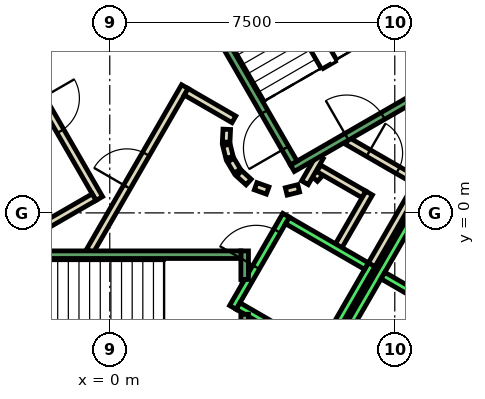
"""IFC4 building model, lengths in metres.
Left out: names, types, materials, properties, quantities, classifications, styles, units other than length and angle.
Written with IfcOpenShell. Run it as: python <this file> out.ifc"""

import sys

from ifc_helpers import new_model, si_unit, direction, frame, frame_2d, origin, place, context, subcontext, project, spatial, rectangle, extrude, element, fill, save


model = new_model("IFC4")
c1 = context("Model", 3, precision=1e-05, world=origin(), true_north=direction((0.0, 1.0)))
c2 = subcontext(c1, "Body", "Model", "MODEL_VIEW")
j1 = project(units=[si_unit("LENGTHUNIT", "METRE"), si_unit("PLANEANGLEUNIT", "RADIAN")], contexts=[c1])
p1 = place(None, origin())
s1 = spatial("IfcSite", under=j1, at=p1, CompositionType="ELEMENT")
p2 = place(p1, origin())
s2 = spatial("IfcBuilding", under=s1, at=p2, CompositionType="ELEMENT")
p3 = place(p2, frame((0.0, 0.0, 167.6)))
s3 = spatial("IfcBuildingStorey", under=s2, at=p3, CompositionType="ELEMENT", Elevation=167.6)
p4 = place(p3, frame((5.39, 0.898, 0.0), z_axis=(0.0, 0.0, 1.0), x_axis=(0.673828488714, 0.738887791073, 0.0)))
e1 = element("IfcWall", 1, at=p4, inside=s3, PredefinedType="PARTITIONING", context=c2, shape_type="SweptSolid", body=[
    extrude(rectangle(XDim=0.263, YDim=0.2, at=frame_2d((0.131, 0.0))), origin(), (0.0, 0.0, 1.0), 3.8),
])
p5 = place(p3, frame((5.499, 1.172, 0.0), z_axis=(0.0, 0.0, 1.0), x_axis=(0.866333505267, -0.499465972466, 0.0)))
e2 = element("IfcWall", 2, at=p5, inside=s3, PredefinedType="PARTITIONING", context=c2, shape_type="SweptSolid", body=[
    extrude(rectangle(XDim=1.374, YDim=0.2, at=frame_2d((0.687, 0.0))), origin(), (0.0, 0.0, 1.0), 3.8),
])
p6 = place(p3, frame((6.826, 0.522, 0.0), z_axis=(0.0, 0.0, 1.0), x_axis=(-0.500016722714, -0.866015748706, 0.0)))
e3 = element("IfcWall", 3, at=p6, inside=s3, PredefinedType="PARTITIONING", context=c2, shape_type="SweptSolid", body=[
    extrude(rectangle(XDim=1.7, YDim=0.2, at=frame_2d((0.85, 0.0))), origin(), (0.0, 0.0, 1.0), 3.8),
])
p7 = place(p3, frame((6.25, 1.894, 0.0), z_axis=(0.0, 0.0, 1.0), x_axis=(0.866043184279, -0.499969202016, 0.0)))
e4 = element("IfcWall", 4, at=p7, inside=s3, PredefinedType="PARTITIONING", context=c2, shape_type="SweptSolid", body=[
    extrude(rectangle(XDim=2.084, YDim=0.2, at=frame_2d((1.042, 0.0))), origin(), (0.0, 0.0, 1.0), 3.8),
])
p8 = place(p7, frame((0.642, 0.0, 0.0)))
e5 = element("IfcOpeningElement", 5, at=p8, cuts=e4, PredefinedType="OPENING", context=c2, shape_type="SweptSolid", body=[
    extrude(rectangle(XDim=0.9, YDim=2.1, at=frame_2d((0.45, 1.05))), frame((0.0, 0.11, 0.0), z_axis=(0.0, -1.0, 0.0), x_axis=(1.0, 0.0, 0.0)), (0.0, 0.0, 1.0), 0.22),
])
p9 = place(p3, frame((8.192, 0.888, 0.0), z_axis=(0.0, 0.0, 1.0), x_axis=(-0.499940625693, -0.866059680843, 0.0)))
e6 = element("IfcWall", 6, at=p9, inside=s3, PredefinedType="PARTITIONING", context=c2, shape_type="SweptSolid", body=[
    extrude(rectangle(XDim=2.68, YDim=0.2, at=frame_2d((1.34, 0.0))), origin(), (0.0, 0.0, 1.0), 3.8),
])
p10 = place(p3, frame((5.135, 0.793, 0.0), z_axis=(0.0, 0.0, 1.0), x_axis=(0.499526442893, 0.866298639529, 0.0)))
e7 = element("IfcWall", 7, at=p10, inside=s3, PredefinedType="PARTITIONING", context=c2, shape_type="SweptSolid", body=[
    extrude(rectangle(XDim=0.791, YDim=0.2, at=frame_2d((0.396, 0.0))), origin(), (0.0, 0.0, 1.0), 3.8),
])
p11 = place(p3, frame((-0.52, -1.0, 0.0), z_axis=(0.0, 0.0, 1.0), x_axis=(0.50011622646, 0.865958290007, 0.0)))
e8 = element("IfcWall", 8, at=p11, inside=s3, PredefinedType="PARTITIONING", context=c2, shape_type="SweptSolid", body=[
    extrude(rectangle(XDim=4.991, YDim=0.2, at=frame_2d((2.496, 0.0))), origin(), (0.0, 0.0, 1.0), 3.8),
])
p12 = place(p11, frame((1.945, 0.0, 0.0)))
e9 = element("IfcOpeningElement", 9, at=p12, cuts=e8, PredefinedType="OPENING", context=c2, shape_type="SweptSolid", body=[
    extrude(rectangle(XDim=1.0, YDim=2.1, at=frame_2d((0.5, 1.05))), frame((0.0, 0.11, 0.0), z_axis=(0.0, -1.0, 0.0), x_axis=(1.0, 0.0, 0.0)), (0.0, 0.0, 1.0), 0.22),
])
p13 = place(p3, frame((2.012, 3.186, 0.0), z_axis=(0.0, 0.0, 1.0), x_axis=(0.865891012941, -0.500232699559, 0.0)))
e10 = element("IfcWall", 10, at=p13, inside=s3, PredefinedType="PARTITIONING", context=c2, shape_type="SweptSolid", body=[
    extrude(rectangle(XDim=1.449, YDim=0.2, at=frame_2d((0.725, 0.0))), origin(), (0.0, 0.0, 1.0), 3.8),
])
p14 = place(p3, frame((3.079, 2.199, 0.0), z_axis=(0.0, 0.0, 1.0), x_axis=(-0.047771483479, -0.998858290933, 0.0)))
e11 = element("IfcWall", 11, at=p14, inside=s3, PredefinedType="PARTITIONING", context=c2, shape_type="SweptSolid", body=[
    extrude(rectangle(XDim=0.337, YDim=0.2, at=frame_2d((0.169, 0.0))), origin(), (0.0, 0.0, 1.0), 3.8),
])
p15 = place(p3, frame((3.07, 1.786, 0.0), z_axis=(0.0, 0.0, 1.0), x_axis=(0.242705583207, -0.970099994784, 0.0)))
e12 = element("IfcWall", 12, at=p15, inside=s3, PredefinedType="PARTITIONING", context=c2, shape_type="SweptSolid", body=[
    extrude(rectangle(XDim=0.338, YDim=0.2, at=frame_2d((0.169, 0.0))), origin(), (0.0, 0.0, 1.0), 3.8),
])
for number, where, z_axis, x_axis in (
    (13, (3.182, 1.388, 0.0), (0.0, 0.0, 1.0), (0.512, -0.859, 0.0)),
    (14, (3.404, 1.039, 0.0), (0.0, 0.0, 1.0), (0.74, -0.672, 0.0)),
):
    element("IfcWall", number, at=place(p3, frame(where, z_axis=z_axis, x_axis=x_axis)), inside=s3, PredefinedType="PARTITIONING", context=c2, shape_type="SweptSolid", body=[
        extrude(rectangle(XDim=0.338, YDim=0.2, at=frame_2d((0.169, 0.0))), origin(), (0.0, 0.0, 1.0), 3.8),
    ])
p16 = place(p3, frame((3.838, 0.702, 0.0), z_axis=(0.0, 0.0, 1.0), x_axis=(0.941035081519, -0.338308993895, 0.0)))
e15 = element("IfcWall", 15, at=p16, inside=s3, PredefinedType="PARTITIONING", context=c2, shape_type="SweptSolid", body=[
    extrude(rectangle(XDim=0.337, YDim=0.2, at=frame_2d((0.168, 0.0))), origin(), (0.0, 0.0, 1.0), 3.8),
])
p17 = place(p3, frame((4.644, 0.564, 0.0), z_axis=(0.0, 0.0, 1.0), x_axis=(0.969929076366, 0.243387729394, 0.0)))
e16 = element("IfcWall", 16, at=p17, inside=s3, PredefinedType="PARTITIONING", context=c2, shape_type="SweptSolid", body=[
    extrude(rectangle(XDim=0.337, YDim=0.2, at=frame_2d((0.168, 0.0))), origin(), (0.0, 0.0, 1.0), 3.8),
])
p18 = place(p3, frame((-2.771, 4.7, 0.0), z_axis=(0.0, 0.0, 1.0), x_axis=(0.499969479948, -0.866043023828, 0.0)))
e17 = element("IfcWall", 17, at=p18, inside=s3, PredefinedType="PARTITIONING", context=c2, shape_type="SweptSolid", body=[
    extrude(rectangle(XDim=4.99, YDim=0.2, at=frame_2d((2.495, 0.0))), origin(), (0.0, 0.0, 1.0), 3.8),
])
p19 = place(p18, frame((1.945, 0.0, 0.0)))
e18 = element("IfcOpeningElement", 18, at=p19, cuts=e17, PredefinedType="OPENING", context=c2, shape_type="SweptSolid", body=[
    extrude(rectangle(XDim=1.0, YDim=2.1, at=frame_2d((0.5, 1.05))), frame((0.0, 0.11, 0.0), z_axis=(0.0, -1.0, 0.0), x_axis=(1.0, 0.0, 0.0)), (0.0, 0.0, 1.0), 0.22),
])
p20 = place(p3, frame((-0.412, 0.414, 0.0), z_axis=(0.0, 0.0, 1.0), x_axis=(-0.866017369001, -0.500013916395, 0.0)))
e19 = element("IfcWall", 19, at=p20, inside=s3, PredefinedType="PARTITIONING", context=c2, shape_type="SweptSolid", body=[
    extrude(rectangle(XDim=1.45, YDim=0.2, at=frame_2d((0.725, 0.0))), origin(), (0.0, 0.0, 1.0), 3.8),
])
p21 = place(p3, frame((3.24, -2.488, 0.0), z_axis=(0.0, 0.0, 1.0), x_axis=(0.49994636267, 0.866056369097, 0.0)))
e20 = element("IfcWall", 20, at=p21, inside=s3, PredefinedType="STANDARD", context=c2, shape_type="SweptSolid", body=[
    extrude(rectangle(XDim=2.8, YDim=0.2, at=frame_2d((1.4, 0.0))), origin(), (0.0, 0.0, 1.0), 3.8),
])
p22 = place(p21, frame((1.225, 0.0, 0.0)))
e21 = element("IfcOpeningElement", 21, at=p22, cuts=e20, PredefinedType="OPENING", context=c2, shape_type="SweptSolid", body=[
    extrude(rectangle(XDim=1.1, YDim=2.1, at=frame_2d((0.55, 1.05))), frame((0.0, 0.11, 0.0), z_axis=(0.0, -1.0, 0.0), x_axis=(1.0, 0.0, 0.0)), (0.0, 0.0, 1.0), 0.22),
])
p23 = place(p3, frame((5.492, -3.788, 0.0), z_axis=(0.0, 0.0, 1.0), x_axis=(0.500011755427, 0.866018616679, 0.0)))
e22 = element("IfcWall", 22, at=p23, inside=s3, PredefinedType="STANDARD", context=c2, shape_type="SweptSolid", body=[
    extrude(rectangle(XDim=2.8, YDim=0.2, at=frame_2d((1.4, 0.0))), origin(), (0.0, 0.0, 1.0), 3.8),
])
p24 = place(p3, frame((3.377, -2.452, 0.0), z_axis=(0.0, 0.0, 1.0), x_axis=(0.865955154139, -0.50012165622, 0.0)))
e23 = element("IfcWall", 23, at=p24, inside=s3, PredefinedType="STANDARD", context=c2, shape_type="SweptSolid", body=[
    extrude(rectangle(XDim=2.4, YDim=0.2, at=frame_2d((1.2, 0.0))), origin(), (0.0, 0.0, 1.0), 3.8),
])
p25 = place(p3, frame((4.677, -0.2, 0.0), z_axis=(0.0, 0.0, 1.0), x_axis=(0.865973769406, -0.500089422704, 0.0)))
e24 = element("IfcWall", 24, at=p25, inside=s3, PredefinedType="STANDARD", context=c2, shape_type="SweptSolid", body=[
    extrude(rectangle(XDim=2.399, YDim=0.2, at=frame_2d((1.2, 0.0))), origin(), (0.0, 0.0, 1.0), 3.8),
])
p26 = place(p3, frame((4.451, -6.19, 0.0), z_axis=(0.0, 0.0, 1.0), x_axis=(0.50000090737, 0.866024879913, 0.0)))
e25 = element("IfcWall", 25, at=p26, inside=s3, PredefinedType="STANDARD", context=c2, shape_type="SweptSolid", body=[
    extrude(rectangle(XDim=10.6, YDim=0.2, at=frame_2d((5.3, 0.0))), origin(), (0.0, 0.0, 1.0), 3.8),
])
p27 = place(p3, frame((7.188, -1.65, 0.0), z_axis=(0.0, 0.0, 1.0), x_axis=(0.866022959057, -0.500004234368, 0.0)))
e26 = element("IfcWall", 26, at=p27, inside=s3, PredefinedType="STANDARD", context=c2, shape_type="SweptSolid", body=[
    extrude(rectangle(XDim=2.5, YDim=0.2, at=frame_2d((1.25, 0.0))), origin(), (0.0, 0.0, 1.0), 3.8),
])
p28 = place(p3, frame((3.55, -2.667, 0.0), z_axis=(0.0, 0.0, 1.0), x_axis=(0.0, -1.0, 0.0)))
e27 = element("IfcWall", 27, at=p28, inside=s3, PredefinedType="STANDARD", context=c2, shape_type="SweptSolid", body=[
    extrude(rectangle(XDim=2.733, YDim=0.2, at=frame_2d((1.366, 0.0))), origin(), (0.0, 0.0, 1.0), 3.8),
])
p29 = place(p3, frame((3.55, -1.0, 0.0), z_axis=(0.0, 0.0, 1.0), x_axis=(0.0, -1.0, 0.0)))
e28 = element("IfcWall", 28, at=p29, inside=s3, PredefinedType="STANDARD", context=c2, shape_type="SweptSolid", body=[
    extrude(rectangle(XDim=0.751, YDim=0.2, at=frame_2d((0.375, 0.0))), origin(), (0.0, 0.0, 1.0), 3.8),
])
p30 = place(p3, frame((-3.45, -1.1, 0.0), z_axis=(0.0, 0.0, 1.0), x_axis=(1.0, 0.0, 0.0)))
e29 = element("IfcWall", 29, at=p30, inside=s3, PredefinedType="STANDARD", context=c2, shape_type="SweptSolid", body=[
    extrude(rectangle(XDim=6.9, YDim=0.2, at=frame_2d((3.45, 0.0))), origin(), (0.0, 0.0, 1.0), 3.8),
])
p31 = place(p30, frame((0.45, 0.0, 0.0)))
e30 = element("IfcOpeningElement", 30, at=p31, cuts=e29, PredefinedType="OPENING", context=c2, shape_type="SweptSolid", body=[
    extrude(rectangle(XDim=1.1, YDim=2.2, at=frame_2d((0.55, 1.1))), frame((0.0, 0.11, 0.0), z_axis=(0.0, -1.0, 0.0), x_axis=(1.0, 0.0, 0.0)), (0.0, 0.0, 1.0), 0.22),
])
p32 = place(p3, frame((4.806, 1.176, 0.0), z_axis=(0.0, 0.0, 1.0), x_axis=(0.866059941101, 0.499940174841, 0.0)))
e31 = element("IfcWall", 31, at=p32, inside=s3, PredefinedType="STANDARD", context=c2, shape_type="SweptSolid", body=[
    extrude(rectangle(XDim=4.4, YDim=0.2, at=frame_2d((2.2, 0.0))), origin(), (0.0, 0.0, 1.0), 3.8),
])
p33 = place(p32, frame((1.65, 0.0, 0.0)))
e32 = element("IfcOpeningElement", 32, at=p33, cuts=e31, PredefinedType="OPENING", context=c2, shape_type="SweptSolid", body=[
    extrude(rectangle(XDim=1.1, YDim=2.2, at=frame_2d((0.55, 1.1))), frame((0.0, 0.11, 0.0), z_axis=(0.0, -1.0, 0.0), x_axis=(1.0, 0.0, 0.0)), (0.0, 0.0, 1.0), 0.22),
])
p34 = place(p3, frame((4.843, 1.312, 0.0), z_axis=(0.0, 0.0, 1.0), x_axis=(-0.499963383562, 0.866046543262, 0.0)))
e33 = element("IfcWall", 33, at=p34, inside=s3, PredefinedType="STANDARD", context=c2, shape_type="SweptSolid", body=[
    extrude(rectangle(XDim=6.9, YDim=0.2, at=frame_2d((3.45, 0.0))), origin(), (0.0, 0.0, 1.0), 3.8),
])
p35 = place(p34, frame((0.45, 0.0, 0.0)))
e34 = element("IfcOpeningElement", 34, at=p35, cuts=e33, PredefinedType="OPENING", context=c2, shape_type="SweptSolid", body=[
    extrude(rectangle(XDim=1.1, YDim=2.2, at=frame_2d((0.55, 1.1))), frame((0.0, 0.11, 0.0), z_axis=(0.0, -1.0, 0.0), x_axis=(1.0, 0.0, 0.0)), (0.0, 0.0, 1.0), 0.22),
])
p36 = place(p3, frame((8.48, 3.412, 0.0), z_axis=(0.0, 0.0, 1.0), x_axis=(-0.499978703459, 0.866037698999, 0.0)))
e35 = element("IfcWall", 35, at=p36, inside=s3, PredefinedType="STANDARD", context=c2, shape_type="SweptSolid", body=[
    extrude(rectangle(XDim=6.9, YDim=0.2, at=frame_2d((3.45, 0.0))), origin(), (0.0, 0.0, 1.0), 3.8),
])
p37 = place(p3, frame((-1.393, 7.288, 0.0), z_axis=(0.0, 0.0, 1.0), x_axis=(-0.499963383562, -0.866046543262, 0.0)))
e36 = element("IfcWall", 36, at=p37, inside=s3, PredefinedType="STANDARD", context=c2, shape_type="SweptSolid", body=[
    extrude(rectangle(XDim=6.9, YDim=0.2, at=frame_2d((3.45, 0.0))), origin(), (0.0, 0.0, 1.0), 3.8),
])
p38 = place(p37, frame((0.45, 0.0, 0.0)))
e37 = element("IfcOpeningElement", 37, at=p38, cuts=e36, PredefinedType="OPENING", context=c2, shape_type="SweptSolid", body=[
    extrude(rectangle(XDim=1.1, YDim=2.2, at=frame_2d((0.55, 1.1))), frame((0.0, 0.11, 0.0), z_axis=(0.0, -1.0, 0.0), x_axis=(1.0, 0.0, 0.0)), (0.0, 0.0, 1.0), 0.22),
])
p39 = place(p12, origin())
e38 = element("IfcDoor", 38, at=p39, inside=s3, OperationType="SINGLE_SWING_LEFT", PredefinedType="DOOR", context=c2, shape_type="SweptSolid", body=[
    extrude(rectangle(XDim=1.0, YDim=2.1, at=frame_2d((0.5, 1.05))), frame((0.0, 0.025, 0.0), z_axis=(0.0, -1.0, 0.0), x_axis=(1.0, 0.0, 0.0)), (0.0, 0.0, 1.0), 0.05),
])
fill(e9, e38)
p40 = place(p19, origin())
e39 = element("IfcDoor", 39, at=p40, inside=s3, OperationType="SINGLE_SWING_RIGHT", PredefinedType="DOOR", context=c2, shape_type="SweptSolid", body=[
    extrude(rectangle(XDim=1.0, YDim=2.1, at=frame_2d((0.5, 1.05))), frame((0.0, 0.025, 0.0), z_axis=(0.0, -1.0, 0.0), x_axis=(1.0, 0.0, 0.0)), (0.0, 0.0, 1.0), 0.05),
])
fill(e18, e39)
p41 = place(p8, origin())
e40 = element("IfcDoor", 40, at=p41, inside=s3, OperationType="SINGLE_SWING_LEFT", PredefinedType="DOOR", context=c2, shape_type="SweptSolid", body=[
    extrude(rectangle(XDim=0.9, YDim=2.1, at=frame_2d((0.45, 1.05))), frame((0.0, 0.025, 0.0), z_axis=(0.0, -1.0, 0.0), x_axis=(1.0, 0.0, 0.0)), (0.0, 0.0, 1.0), 0.05),
])
fill(e5, e40)
p42 = place(p22, origin())
e41 = element("IfcDoor", 41, at=p42, inside=s3, OperationType="SLIDING_TO_LEFT", PredefinedType="DOOR", context=c2, shape_type="SweptSolid", body=[
    extrude(rectangle(XDim=1.1, YDim=2.1, at=frame_2d((0.55, 1.05))), frame((0.0, 0.025, 0.0), z_axis=(0.0, -1.0, 0.0), x_axis=(1.0, 0.0, 0.0)), (0.0, 0.0, 1.0), 0.05),
])
fill(e21, e41)
p43 = place(p35, origin())
e42 = element("IfcDoor", 42, at=p43, inside=s3, OperationType="SINGLE_SWING_LEFT", PredefinedType="DOOR", context=c2, shape_type="SweptSolid", body=[
    extrude(rectangle(XDim=1.1, YDim=2.2, at=frame_2d((0.55, 1.1))), frame((0.0, 0.025, 0.0), z_axis=(0.0, -1.0, 0.0), x_axis=(1.0, 0.0, 0.0)), (0.0, 0.0, 1.0), 0.05),
])
fill(e34, e42)
p44 = place(p33, origin())
e43 = element("IfcDoor", 43, at=p44, inside=s3, OperationType="SINGLE_SWING_LEFT", PredefinedType="DOOR", context=c2, shape_type="SweptSolid", body=[
    extrude(rectangle(XDim=1.1, YDim=2.2, at=frame_2d((0.55, 1.1))), frame((0.0, 0.025, 0.0), z_axis=(0.0, -1.0, 0.0), x_axis=(1.0, 0.0, 0.0)), (0.0, 0.0, 1.0), 0.05),
])
fill(e32, e43)
save(model, sys.argv[1])
